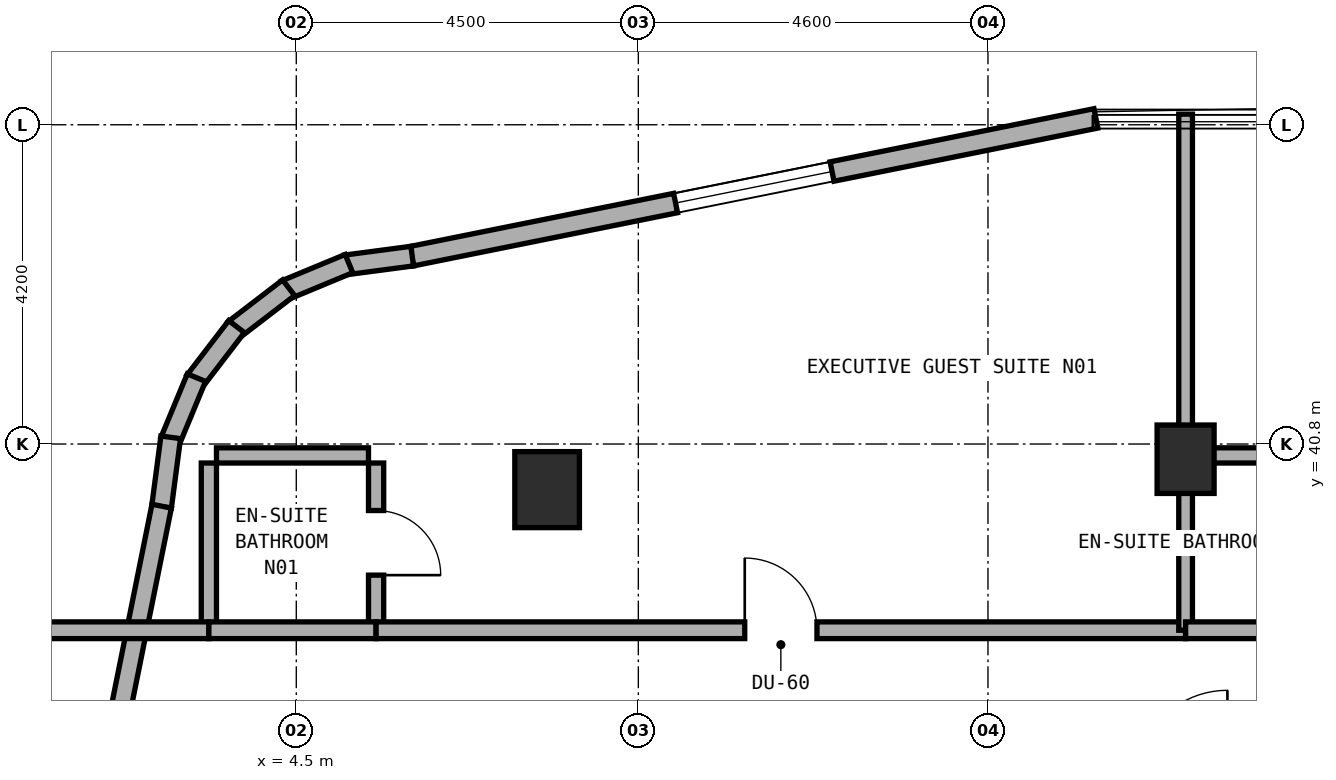
"""IFC4 building model, lengths in metres.
Left out: names, types, materials, properties, quantities, classifications, styles, units other than length and angle.
Written with IfcOpenShell. Run it as: python <this file> out.ifc"""

import sys

from ifc_helpers import new_model, si_unit, direction, frame, frame_2d, origin, origin_2d, place, context, subcontext, project, spatial, rectangle, extrude, element, fill, save


model = new_model("IFC4")
c1 = context("Model", 3, precision=1e-05, world=origin(), true_north=direction((0.0, 1.0)))
c2 = subcontext(c1, "Body", "Model", "MODEL_VIEW")
j1 = project(units=[si_unit("LENGTHUNIT", "METRE"), si_unit("PLANEANGLEUNIT", "RADIAN")], contexts=[c1])
p1 = place(None, origin())
s1 = spatial("IfcSite", under=j1, at=p1, CompositionType="ELEMENT")
p2 = place(p1, origin())
s2 = spatial("IfcBuilding", under=s1, at=p2, CompositionType="ELEMENT")
p3 = place(p2, frame((0.0, 0.0, 145.0)))
s3 = spatial("IfcBuildingStorey", under=s2, at=p3, CompositionType="ELEMENT", Elevation=145.0)
p4 = place(p3, frame((16.2, 40.6, 0.0), z_axis=(0.0, 0.0, 1.0), x_axis=(1.0, 0.0, 0.0)))
e1 = element("IfcColumn", 1, at=p4, inside=s3, PredefinedType="COLUMN", context=c2, shape_type="SweptSolid", body=[
    extrude(rectangle(XDim=0.75, YDim=0.9, at=origin_2d()), origin(), (0.0, 0.0, 1.0), 3.5),
])
p5 = place(p3, frame((7.8, 40.2, 0.0), z_axis=(0.0, 0.0, 1.0), x_axis=(1.0, 0.0, 0.0)))
e2 = element("IfcColumn", 2, at=p5, inside=s3, PredefinedType="COLUMN", context=c2, shape_type="SweptSolid", body=[
    extrude(rectangle(XDim=0.85, YDim=1.0, at=origin_2d()), origin(), (0.0, 0.0, 1.0), 3.5),
])
p6 = place(p3, frame((15.02, 45.084, 0.0), z_axis=(0.0, 0.0, 1.0), x_axis=(-0.980315963543, -0.197435082048, 0.0)))
e3 = element("IfcWall", 3, at=p6, inside=s3, PredefinedType="STANDARD", context=c2, shape_type="SweptSolid", body=[
    extrude(rectangle(XDim=9.183, YDim=0.26, at=frame_2d((4.591, 0.0))), origin(), (0.0, 0.0, 1.0), 3.22),
])
p7 = place(p6, frame((3.541, 0.0, 0.85)))
e4 = element("IfcOpeningElement", 4, at=p7, cuts=e3, PredefinedType="OPENING", context=c2, shape_type="SweptSolid", body=[
    extrude(rectangle(XDim=2.1, YDim=1.5, at=frame_2d((1.05, 0.75))), frame((0.0, 0.14, 0.0), z_axis=(0.0, -1.0, 0.0), x_axis=(1.0, 0.0, 0.0)), (0.0, 0.0, 1.0), 0.28),
])
p8 = place(p3, frame((6.025, 43.272, 0.0), z_axis=(0.0, 0.0, 1.0), x_axis=(-0.991388484223, -0.130953706898, 0.0)))
e5 = element("IfcWall", 5, at=p8, inside=s3, PredefinedType="STANDARD", context=c2, shape_type="SweptSolid", body=[
    extrude(rectangle(XDim=0.885, YDim=0.26, at=frame_2d((0.443, 0.0))), origin(), (0.0, 0.0, 1.0), 3.22),
])
p9 = place(p3, frame((5.193, 43.174, 0.0), z_axis=(0.0, 0.0, 1.0), x_axis=(-0.923627776508, -0.383290660547, 0.0)))
e6 = element("IfcWall", 6, at=p9, inside=s3, PredefinedType="STANDARD", context=c2, shape_type="SweptSolid", body=[
    extrude(rectangle(XDim=0.903, YDim=0.26, at=frame_2d((0.452, 0.0))), origin(), (0.0, 0.0, 1.0), 3.22),
])
p10 = place(p3, frame((4.399, 42.856, 0.0), z_axis=(0.0, 0.0, 1.0), x_axis=(-0.793458244748, -0.608624690463, 0.0)))
e7 = element("IfcWall", 7, at=p10, inside=s3, PredefinedType="STANDARD", context=c2, shape_type="SweptSolid", body=[
    extrude(rectangle(XDim=0.902, YDim=0.26, at=frame_2d((0.451, 0.0))), origin(), (0.0, 0.0, 1.0), 3.22),
])
p11 = place(p3, frame((3.714, 42.345, 0.0), z_axis=(0.0, 0.0, 1.0), x_axis=(-0.608494022858, -0.793558456666, 0.0)))
e8 = element("IfcWall", 8, at=p11, inside=s3, PredefinedType="STANDARD", context=c2, shape_type="SweptSolid", body=[
    extrude(rectangle(XDim=0.902, YDim=0.26, at=frame_2d((0.451, 0.0))), origin(), (0.0, 0.0, 1.0), 3.22),
])
p12 = place(p3, frame((3.186, 41.673, 0.0), z_axis=(0.0, 0.0, 1.0), x_axis=(-0.383155708213, -0.923683767999, 0.0)))
e9 = element("IfcWall", 9, at=p12, inside=s3, PredefinedType="STANDARD", context=c2, shape_type="SweptSolid", body=[
    extrude(rectangle(XDim=0.903, YDim=0.26, at=frame_2d((0.451, 0.0))), origin(), (0.0, 0.0, 1.0), 3.22),
])
p13 = place(p3, frame((2.848, 40.888, 0.0), z_axis=(0.0, 0.0, 1.0), x_axis=(-0.130200706103, -0.991487658083, 0.0)))
e10 = element("IfcWall", 10, at=p13, inside=s3, PredefinedType="STANDARD", context=c2, shape_type="SweptSolid", body=[
    extrude(rectangle(XDim=0.921, YDim=0.26, at=frame_2d((0.46, 0.0))), origin(), (0.0, 0.0, 1.0), 3.22),
])
p14 = place(p3, frame((2.729, 39.982, 0.0), z_axis=(0.0, 0.0, 1.0), x_axis=(-0.197435082048, -0.980315963543, 0.0)))
e11 = element("IfcWall", 11, at=p14, inside=s3, PredefinedType="STANDARD", context=c2, shape_type="SweptSolid", body=[
    extrude(rectangle(XDim=9.183, YDim=0.26, at=frame_2d((4.591, 0.0))), origin(), (0.0, 0.0, 1.0), 3.22),
])
p15 = place(p14, frame((4.436, 0.0, 0.85)))
e12 = element("IfcOpeningElement", 12, at=p15, cuts=e11, PredefinedType="OPENING", context=c2, shape_type="SweptSolid", body=[
    extrude(rectangle(XDim=2.1, YDim=1.5, at=frame_2d((1.05, 0.75))), frame((0.0, 0.14, 0.0), z_axis=(0.0, -1.0, 0.0), x_axis=(1.0, 0.0, 0.0)), (0.0, 0.0, 1.0), 0.28),
])
p16 = place(p3, frame((5.55, 38.45, 0.0), z_axis=(0.0, 0.0, 1.0), x_axis=(0.0, 1.0, 0.0)))
e13 = element("IfcWall", 13, at=p16, inside=s3, PredefinedType="PLUMBINGWALL", context=c2, shape_type="SweptSolid", body=[
    extrude(rectangle(XDim=2.1, YDim=0.2, at=frame_2d((1.05, 0.0))), origin(), (0.0, 0.0, 1.0), 3.22),
])
p17 = place(p16, frame((0.625, 0.0, 0.0)))
e14 = element("IfcOpeningElement", 14, at=p17, cuts=e13, PredefinedType="OPENING", context=c2, shape_type="SweptSolid", body=[
    extrude(rectangle(XDim=0.85, YDim=2.1, at=frame_2d((0.425, 1.05))), frame((0.0, 0.11, 0.0), z_axis=(0.0, -1.0, 0.0), x_axis=(1.0, 0.0, 0.0)), (0.0, 0.0, 1.0), 0.22),
])
p18 = place(p3, frame((3.45, 40.65, 0.0), z_axis=(0.0, 0.0, 1.0), x_axis=(1.0, 0.0, 0.0)))
e15 = element("IfcWall", 15, at=p18, inside=s3, PredefinedType="PLUMBINGWALL", context=c2, shape_type="SweptSolid", body=[
    extrude(rectangle(XDim=2.0, YDim=0.2, at=frame_2d((1.0, 0.0))), origin(), (0.0, 0.0, 1.0), 3.22),
])
p19 = place(p3, frame((3.35, 38.45, 0.0), z_axis=(0.0, 0.0, 1.0), x_axis=(0.0, 1.0, 0.0)))
e16 = element("IfcWall", 16, at=p19, inside=s3, PredefinedType="PLUMBINGWALL", context=c2, shape_type="SweptSolid", body=[
    extrude(rectangle(XDim=2.1, YDim=0.2, at=frame_2d((1.05, 0.0))), origin(), (0.0, 0.0, 1.0), 3.22),
])
p20 = place(p3, frame((0.96, 38.35, 0.0), z_axis=(0.0, 0.0, 1.0), x_axis=(1.0, 0.0, 0.0)))
e17 = element("IfcWall", 17, at=p20, inside=s3, PredefinedType="SOLIDWALL", context=c2, shape_type="SweptSolid", body=[
    extrude(rectangle(XDim=2.39, YDim=0.22, at=frame_2d((1.195, 0.0))), origin(), (0.0, 0.0, 1.0), 3.22),
])
p21 = place(p3, frame((3.35, 38.35, 0.0), z_axis=(0.0, 0.0, 1.0), x_axis=(1.0, 0.0, 0.0)))
e18 = element("IfcWall", 18, at=p21, inside=s3, PredefinedType="SOLIDWALL", context=c2, shape_type="SweptSolid", body=[
    extrude(rectangle(XDim=2.2, YDim=0.22, at=frame_2d((1.1, 0.0))), origin(), (0.0, 0.0, 1.0), 3.22),
])
p22 = place(p3, frame((5.55, 38.35, 0.0), z_axis=(0.0, 0.0, 1.0), x_axis=(1.0, 0.0, 0.0)))
e19 = element("IfcWall", 19, at=p22, inside=s3, PredefinedType="SOLIDWALL", context=c2, shape_type="SweptSolid", body=[
    extrude(rectangle(XDim=10.65, YDim=0.22, at=frame_2d((5.325, 0.0))), origin(), (0.0, 0.0, 1.0), 2.795),
])
p23 = place(p22, frame((4.85, 0.0, 0.0)))
e20 = element("IfcOpeningElement", 20, at=p23, cuts=e19, PredefinedType="OPENING", context=c2, shape_type="SweptSolid", body=[
    extrude(rectangle(XDim=0.95, YDim=2.1, at=frame_2d((0.475, 1.05))), frame((0.0, 0.12, 0.0), z_axis=(0.0, -1.0, 0.0), x_axis=(1.0, 0.0, 0.0)), (0.0, 0.0, 1.0), 0.24),
])
p24 = place(p3, frame((16.2, 38.35, 0.0), z_axis=(0.0, 0.0, 1.0), x_axis=(0.0, 1.0, 0.0)))
e21 = element("IfcWall", 21, at=p24, inside=s3, PredefinedType="SOLIDWALL", context=c2, shape_type="SweptSolid", body=[
    extrude(rectangle(XDim=6.79, YDim=0.18, at=frame_2d((3.395, 0.0))), origin(), (0.0, 0.0, 1.0), 2.795),
])
p25 = place(p3, frame((16.3, 40.65, 0.0), z_axis=(0.0, 0.0, 1.0), x_axis=(1.0, 0.0, 0.0)))
e22 = element("IfcWall", 22, at=p25, inside=s3, PredefinedType="PLUMBINGWALL", context=c2, shape_type="SweptSolid", body=[
    extrude(rectangle(XDim=2.0, YDim=0.2, at=frame_2d((1.0, 0.0))), origin(), (0.0, 0.0, 1.0), 2.835),
])
p26 = place(p3, frame((16.2, 38.35, 0.0), z_axis=(0.0, 0.0, 1.0), x_axis=(1.0, 0.0, 0.0)))
e23 = element("IfcWall", 23, at=p26, inside=s3, PredefinedType="SOLIDWALL", context=c2, shape_type="SweptSolid", body=[
    extrude(rectangle(XDim=2.2, YDim=0.22, at=frame_2d((1.1, 0.0))), origin(), (0.0, 0.0, 1.0), 2.795),
])
p27 = place(p7, origin())
e24 = element("IfcWindow", 24, at=p27, inside=s3, PartitioningType="SINGLE_PANEL", PredefinedType="WINDOW", context=c2, shape_type="SweptSolid", body=[
    extrude(rectangle(XDim=2.1, YDim=1.5, at=frame_2d((1.05, 0.75))), frame((0.0, 0.03, 0.0), z_axis=(0.0, -1.0, 0.0), x_axis=(1.0, 0.0, 0.0)), (0.0, 0.0, 1.0), 0.06),
])
fill(e4, e24)
p28 = place(p17, frame((0.85, 0.0, 0.0), z_axis=(0.0, 0.0, 1.0), x_axis=(-1.0, 0.0, 0.0)))
e25 = element("IfcDoor", 25, at=p28, inside=s3, OperationType="SINGLE_SWING_RIGHT", PredefinedType="DOOR", context=c2, shape_type="SweptSolid", body=[
    extrude(rectangle(XDim=0.85, YDim=2.1, at=frame_2d((0.425, 1.05))), frame((0.0, 0.025, 0.0), z_axis=(0.0, -1.0, 0.0), x_axis=(1.0, 0.0, 0.0)), (0.0, 0.0, 1.0), 0.05),
])
fill(e14, e25)
p29 = place(p23, origin())
e26 = element("IfcDoor", 26, at=p29, inside=s3, OperationType="SINGLE_SWING_LEFT", PredefinedType="DOOR", context=c2, shape_type="SweptSolid", body=[
    extrude(rectangle(XDim=0.95, YDim=2.1, at=frame_2d((0.475, 1.05))), frame((0.0, 0.025, 0.0), z_axis=(0.0, -1.0, 0.0), x_axis=(1.0, 0.0, 0.0)), (0.0, 0.0, 1.0), 0.05),
])
fill(e20, e26)
save(model, sys.argv[1])
